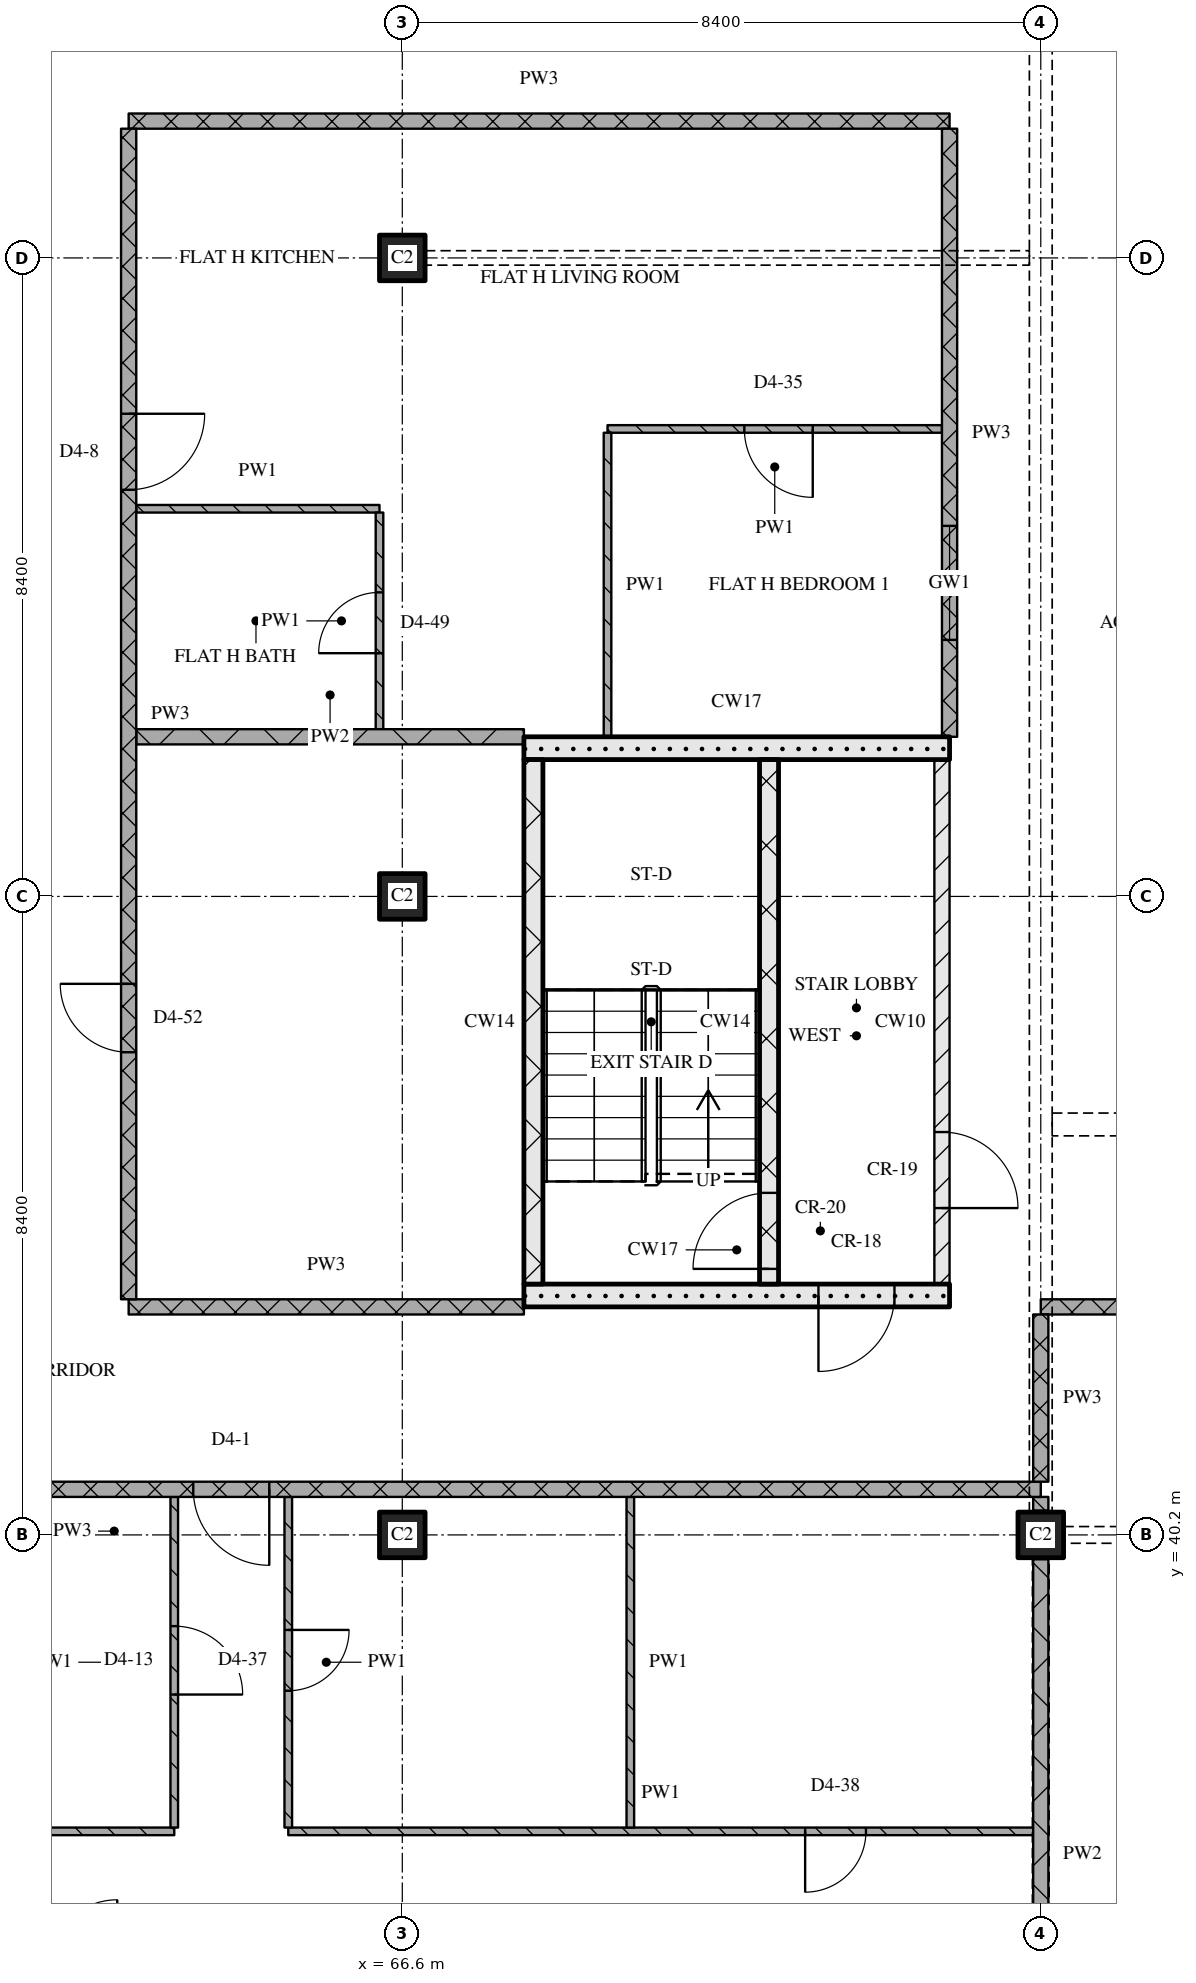
"""IFC4 building model, lengths in metres.
Left out: names, types, materials, properties, quantities, classifications, styles, units other than length and angle.
Written with IfcOpenShell. Run it as: python <this file> out.ifc"""

import sys

from ifc_helpers import new_model, si_unit, direction, frame, frame_2d, origin, origin_2d, place, context, subcontext, project, spatial, rectangle, extrude, element, fill, save


model = new_model("IFC4")
c1 = context("Model", 3, precision=1e-05, world=origin(), true_north=direction((0.0, 1.0)))
c2 = subcontext(c1, "Body", "Model", "MODEL_VIEW")
j1 = project(units=[si_unit("LENGTHUNIT", "METRE"), si_unit("PLANEANGLEUNIT", "RADIAN")], contexts=[c1])
p1 = place(None, origin())
s1 = spatial("IfcSite", under=j1, at=p1, CompositionType="ELEMENT")
p2 = place(p1, origin())
s2 = spatial("IfcBuilding", under=s1, at=p2, CompositionType="ELEMENT")
p3 = place(p2, frame((0.0, 0.0, 241.5)))
s3 = spatial("IfcBuildingStorey", under=s2, at=p3, CompositionType="ELEMENT", Elevation=241.5)
for number, where, z_axis, x_axis in (
    (1, (66.6, 40.2, 0.0), (0.0, 0.0, 1.0), (1.0, 0.0, 0.0)),
    (2, (66.6, 48.6, 0.0), (0.0, 0.0, 1.0), (1.0, 0.0, 0.0)),
    (3, (66.6, 57.0, 0.0), (0.0, 0.0, 1.0), (1.0, 0.0, 0.0)),
    (4, (75.0, 40.2, 0.0), (0.0, 0.0, 1.0), (1.0, 0.0, 0.0)),
):
    element("IfcColumn", number, at=place(p3, frame(where, z_axis=z_axis, x_axis=x_axis)), inside=s3, PredefinedType="COLUMN", context=c2, shape_type="SweptSolid", body=[
        extrude(rectangle(XDim=0.6, YDim=0.6, at=origin_2d()), origin(), (0.0, 0.0, 1.0), 3.6),
    ])
p4 = place(p3, frame((68.2, 43.35, 0.0), z_axis=(0.0, 0.0, 1.0), x_axis=(1.0, 0.0, 0.0)))
e5 = element("IfcWall", 5, at=p4, inside=s3, PredefinedType="SOLIDWALL", context=c2, shape_type="SweptSolid", body=[
    extrude(rectangle(XDim=5.6, YDim=0.3, at=frame_2d((2.8, 0.0))), origin(), (0.0, 0.0, 1.0), 3.32),
])
p5 = place(p4, frame((3.875, 0.0, 0.0)))
e6 = element("IfcOpeningElement", 6, at=p5, cuts=e5, PredefinedType="OPENING", context=c2, shape_type="SweptSolid", body=[
    extrude(rectangle(XDim=1.0, YDim=2.1, at=frame_2d((0.5, 1.05))), frame((0.0, 0.16, 0.0), z_axis=(0.0, -1.0, 0.0), x_axis=(1.0, 0.0, 0.0)), (0.0, 0.0, 1.0), 0.32),
])
p6 = place(p3, frame((68.325, 43.5, 0.0), z_axis=(0.0, 0.0, 1.0), x_axis=(0.0, 1.0, 0.0)))
e7 = element("IfcWall", 7, at=p6, inside=s3, PredefinedType="SOLIDWALL", context=c2, shape_type="SweptSolid", body=[
    extrude(rectangle(XDim=6.9, YDim=0.25, at=frame_2d((3.45, 0.0))), origin(), (0.0, 0.0, 1.0), 3.32),
])
p7 = place(p3, frame((71.425, 43.5, 0.0), z_axis=(0.0, 0.0, 1.0), x_axis=(0.0, 1.0, 0.0)))
e8 = element("IfcWall", 8, at=p7, inside=s3, PredefinedType="SOLIDWALL", context=c2, shape_type="SweptSolid", body=[
    extrude(rectangle(XDim=6.9, YDim=0.25, at=frame_2d((3.45, 0.0))), origin(), (0.0, 0.0, 1.0), 3.32),
])
p8 = place(p7, frame((0.2, 0.0, 0.0)))
e9 = element("IfcOpeningElement", 9, at=p8, cuts=e8, PredefinedType="OPENING", context=c2, shape_type="SweptSolid", body=[
    extrude(rectangle(XDim=1.0, YDim=2.1, at=frame_2d((0.5, 1.05))), frame((0.0, 0.135, 0.0), z_axis=(0.0, -1.0, 0.0), x_axis=(1.0, 0.0, 0.0)), (0.0, 0.0, 1.0), 0.27),
])
p9 = place(p3, frame((73.7, 43.5, 0.0), z_axis=(0.0, 0.0, 1.0), x_axis=(0.0, 1.0, 0.0)))
e10 = element("IfcWall", 10, at=p9, inside=s3, PredefinedType="PARTITIONING", context=c2, shape_type="SweptSolid", body=[
    extrude(rectangle(XDim=6.9, YDim=0.2, at=frame_2d((3.45, 0.0))), origin(), (0.0, 0.0, 1.0), 3.32),
])
p10 = place(p9, frame((1.0, 0.0, 0.0)))
e11 = element("IfcOpeningElement", 11, at=p10, cuts=e10, PredefinedType="OPENING", context=c2, shape_type="SweptSolid", body=[
    extrude(rectangle(XDim=1.0, YDim=2.1, at=frame_2d((0.5, 1.05))), frame((0.0, 0.11, 0.0), z_axis=(0.0, -1.0, 0.0), x_axis=(1.0, 0.0, 0.0)), (0.0, 0.0, 1.0), 0.22),
])
p11 = place(p3, frame((68.2, 50.55, 0.0), z_axis=(0.0, 0.0, 1.0), x_axis=(1.0, 0.0, 0.0)))
e12 = element("IfcWall", 12, at=p11, inside=s3, PredefinedType="SOLIDWALL", context=c2, shape_type="SweptSolid", body=[
    extrude(rectangle(XDim=5.6, YDim=0.3, at=frame_2d((2.8, 0.0))), origin(), (0.0, 0.0, 1.0), 3.32),
])
p12 = place(p3, frame((55.5, 36.3, 0.0), z_axis=(0.0, 0.0, 1.0), x_axis=(1.0, 0.0, 0.0)))
e13 = element("IfcWall", 13, at=p12, inside=s3, PredefinedType="PARTITIONING", context=c2, shape_type="SweptSolid", body=[
    extrude(rectangle(XDim=8.1, YDim=0.1, at=frame_2d((4.05, 0.0))), origin(), (0.0, 0.0, 1.0), 3.32),
])
p13 = place(p3, frame((65.1, 36.3, 0.0), z_axis=(0.0, 0.0, 1.0), x_axis=(1.0, 0.0, 0.0)))
e14 = element("IfcWall", 14, at=p13, inside=s3, PredefinedType="PARTITIONING", context=c2, shape_type="SweptSolid", body=[
    extrude(rectangle(XDim=9.8, YDim=0.1, at=frame_2d((4.9, 0.0))), origin(), (0.0, 0.0, 1.0), 3.32),
])
p14 = place(p13, frame((6.8, 0.0, 0.0)))
e15 = element("IfcOpeningElement", 15, at=p14, cuts=e14, PredefinedType="OPENING", context=c2, shape_type="SweptSolid", body=[
    extrude(rectangle(XDim=0.8, YDim=2.1, at=frame_2d((0.4, 1.05))), frame((0.0, 0.06, 0.0), z_axis=(0.0, -1.0, 0.0), x_axis=(1.0, 0.0, 0.0)), (0.0, 0.0, 1.0), 0.12),
])
p15 = place(p3, frame((75.0, 40.8, 0.0), z_axis=(0.0, 0.0, 1.0), x_axis=(-1.0, 0.0, 0.0)))
e16 = element("IfcWall", 16, at=p15, inside=s3, PredefinedType="PARTITIONING", context=c2, shape_type="SweptSolid", body=[
    extrude(rectangle(XDim=24.38, YDim=0.2, at=frame_2d((12.19, 0.0))), origin(), (0.0, 0.0, 1.0), 3.32),
])
p16 = place(p15, frame((10.15, 0.0, 0.0)))
e17 = element("IfcOpeningElement", 17, at=p16, cuts=e16, PredefinedType="OPENING", context=c2, shape_type="SweptSolid", body=[
    extrude(rectangle(XDim=1.0, YDim=2.1, at=frame_2d((0.5, 1.05))), frame((0.0, 0.11, 0.0), z_axis=(0.0, -1.0, 0.0), x_axis=(1.0, 0.0, 0.0)), (0.0, 0.0, 1.0), 0.22),
])
p17 = place(p3, frame((63.0, 43.2, 0.0), z_axis=(0.0, 0.0, 1.0), x_axis=(1.0, 0.0, 0.0)))
e18 = element("IfcWall", 18, at=p17, inside=s3, PredefinedType="PARTITIONING", context=c2, shape_type="SweptSolid", body=[
    extrude(rectangle(XDim=5.2, YDim=0.2, at=frame_2d((2.6, 0.0))), origin(), (0.0, 0.0, 1.0), 3.32),
])
p18 = place(p3, frame((100.2, 43.2, 0.0), z_axis=(0.0, 0.0, 1.0), x_axis=(-1.0, 0.0, 0.0)))
e19 = element("IfcWall", 19, at=p18, inside=s3, PredefinedType="PARTITIONING", context=c2, shape_type="SweptSolid", body=[
    extrude(rectangle(XDim=25.2, YDim=0.2, at=frame_2d((12.6, 0.0))), origin(), (0.0, 0.0, 1.0), 3.32),
])
p19 = place(p18, frame((9.25, 0.0, 0.0)))
e20 = element("IfcOpeningElement", 20, at=p19, cuts=e19, PredefinedType="OPENING", context=c2, shape_type="SweptSolid", body=[
    extrude(rectangle(XDim=1.0, YDim=2.1, at=frame_2d((0.5, 1.05))), frame((0.0, 0.11, 0.0), z_axis=(0.0, -1.0, 0.0), x_axis=(1.0, 0.0, 0.0)), (0.0, 0.0, 1.0), 0.22),
])
p20 = place(p3, frame((63.1, 50.7, 0.0), z_axis=(0.0, 0.0, 1.0), x_axis=(1.0, 0.0, 0.0)))
e21 = element("IfcWall", 21, at=p20, inside=s3, PredefinedType="PARTITIONING", context=c2, shape_type="SweptSolid", body=[
    extrude(rectangle(XDim=5.1, YDim=0.2, at=frame_2d((2.55, 0.0))), origin(), (0.0, 0.0, 1.0), 3.32),
])
p21 = place(p3, frame((63.1, 53.7, 0.0), z_axis=(0.0, 0.0, 1.0), x_axis=(1.0, 0.0, 0.0)))
e22 = element("IfcWall", 22, at=p21, inside=s3, PredefinedType="PARTITIONING", context=c2, shape_type="SweptSolid", body=[
    extrude(rectangle(XDim=3.2, YDim=0.1, at=frame_2d((1.6, 0.0))), origin(), (0.0, 0.0, 1.0), 3.32),
])
p22 = place(p3, frame((73.7, 54.75, 0.0), z_axis=(0.0, 0.0, 1.0), x_axis=(-1.0, 0.0, 0.0)))
e23 = element("IfcWall", 23, at=p22, inside=s3, PredefinedType="PARTITIONING", context=c2, shape_type="SweptSolid", body=[
    extrude(rectangle(XDim=4.4, YDim=0.1, at=frame_2d((2.2, 0.0))), origin(), (0.0, 0.0, 1.0), 3.32),
])
p23 = place(p22, frame((1.7, 0.0, 0.0)))
e24 = element("IfcOpeningElement", 24, at=p23, cuts=e23, PredefinedType="OPENING", context=c2, shape_type="SweptSolid", body=[
    extrude(rectangle(XDim=0.9, YDim=2.1, at=frame_2d((0.45, 1.05))), frame((0.0, 0.06, 0.0), z_axis=(0.0, -1.0, 0.0), x_axis=(1.0, 0.0, 0.0)), (0.0, 0.0, 1.0), 0.12),
])
p24 = place(p3, frame((63.0, 58.8, 0.0), z_axis=(0.0, 0.0, 1.0), x_axis=(1.0, 0.0, 0.0)))
e25 = element("IfcWall", 25, at=p24, inside=s3, PredefinedType="PARTITIONING", context=c2, shape_type="SweptSolid", body=[
    extrude(rectangle(XDim=10.8, YDim=0.2, at=frame_2d((5.4, 0.0))), origin(), (0.0, 0.0, 1.0), 3.32),
])
p25 = place(p3, frame((63.0, 58.7, 0.0), z_axis=(0.0, 0.0, 1.0), x_axis=(0.0, -1.0, 0.0)))
e26 = element("IfcWall", 26, at=p25, inside=s3, PredefinedType="PARTITIONING", context=c2, shape_type="SweptSolid", body=[
    extrude(rectangle(XDim=15.4, YDim=0.2, at=frame_2d((7.7, 0.0))), origin(), (0.0, 0.0, 1.0), 3.32),
])
p26 = place(p25, frame((3.75, 0.0, 0.0)))
e27 = element("IfcOpeningElement", 27, at=p26, cuts=e26, PredefinedType="OPENING", context=c2, shape_type="SweptSolid", body=[
    extrude(rectangle(XDim=1.0, YDim=2.1, at=frame_2d((0.5, 1.05))), frame((0.0, 0.11, 0.0), z_axis=(0.0, -1.0, 0.0), x_axis=(1.0, 0.0, 0.0)), (0.0, 0.0, 1.0), 0.22),
])
p27 = place(p25, frame((11.25, 0.0, 0.0)))
e28 = element("IfcOpeningElement", 28, at=p27, cuts=e26, PredefinedType="OPENING", context=c2, shape_type="SweptSolid", body=[
    extrude(rectangle(XDim=0.9, YDim=2.1, at=frame_2d((0.45, 1.05))), frame((0.0, 0.11, 0.0), z_axis=(0.0, -1.0, 0.0), x_axis=(1.0, 0.0, 0.0)), (0.0, 0.0, 1.0), 0.22),
])
p28 = place(p3, frame((63.6, 36.35, 0.0), z_axis=(0.0, 0.0, 1.0), x_axis=(0.0, 1.0, 0.0)))
e29 = element("IfcWall", 29, at=p28, inside=s3, PredefinedType="PARTITIONING", context=c2, shape_type="SweptSolid", body=[
    extrude(rectangle(XDim=4.35, YDim=0.1, at=frame_2d((2.175, 0.0))), origin(), (0.0, 0.0, 1.0), 3.32),
])
p29 = place(p28, frame((1.75, 0.0, 0.0)))
e30 = element("IfcOpeningElement", 30, at=p29, cuts=e29, PredefinedType="OPENING", context=c2, shape_type="SweptSolid", body=[
    extrude(rectangle(XDim=0.9, YDim=2.1, at=frame_2d((0.45, 1.05))), frame((0.0, 0.06, 0.0), z_axis=(0.0, -1.0, 0.0), x_axis=(1.0, 0.0, 0.0)), (0.0, 0.0, 1.0), 0.12),
])
p30 = place(p3, frame((65.1, 40.7, 0.0), z_axis=(0.0, 0.0, 1.0), x_axis=(0.0, -1.0, 0.0)))
e31 = element("IfcWall", 31, at=p30, inside=s3, PredefinedType="PARTITIONING", context=c2, shape_type="SweptSolid", body=[
    extrude(rectangle(XDim=4.35, YDim=0.1, at=frame_2d((2.175, 0.0))), origin(), (0.0, 0.0, 1.0), 3.32),
])
p31 = place(p30, frame((1.75, 0.0, 0.0)))
e32 = element("IfcOpeningElement", 32, at=p31, cuts=e31, PredefinedType="OPENING", context=c2, shape_type="SweptSolid", body=[
    extrude(rectangle(XDim=0.8, YDim=2.1, at=frame_2d((0.4, 1.05))), frame((0.0, 0.06, 0.0), z_axis=(0.0, -1.0, 0.0), x_axis=(1.0, 0.0, 0.0)), (0.0, 0.0, 1.0), 0.12),
])
p32 = place(p3, frame((66.3, 50.8, 0.0), z_axis=(0.0, 0.0, 1.0), x_axis=(0.0, 1.0, 0.0)))
e33 = element("IfcWall", 33, at=p32, inside=s3, PredefinedType="PARTITIONING", context=c2, shape_type="SweptSolid", body=[
    extrude(rectangle(XDim=2.85, YDim=0.1, at=frame_2d((1.425, 0.0))), origin(), (0.0, 0.0, 1.0), 3.32),
])
p33 = place(p32, frame((1.0, 0.0, 0.0)))
e34 = element("IfcOpeningElement", 34, at=p33, cuts=e33, PredefinedType="OPENING", context=c2, shape_type="SweptSolid", body=[
    extrude(rectangle(XDim=0.8, YDim=2.1, at=frame_2d((0.4, 1.05))), frame((0.0, 0.06, 0.0), z_axis=(0.0, -1.0, 0.0), x_axis=(1.0, 0.0, 0.0)), (0.0, 0.0, 1.0), 0.12),
])
p34 = place(p3, frame((69.3, 54.7, 0.0), z_axis=(0.0, 0.0, 1.0), x_axis=(0.0, -1.0, 0.0)))
e35 = element("IfcWall", 35, at=p34, inside=s3, PredefinedType="PARTITIONING", context=c2, shape_type="SweptSolid", body=[
    extrude(rectangle(XDim=4.0, YDim=0.1, at=frame_2d((2.0, 0.0))), origin(), (0.0, 0.0, 1.0), 3.32),
])
p35 = place(p3, frame((69.6, 40.7, 0.0), z_axis=(0.0, 0.0, 1.0), x_axis=(0.0, -1.0, 0.0)))
e36 = element("IfcWall", 36, at=p35, inside=s3, PredefinedType="PARTITIONING", context=c2, shape_type="SweptSolid", body=[
    extrude(rectangle(XDim=4.35, YDim=0.1, at=frame_2d((2.175, 0.0))), origin(), (0.0, 0.0, 1.0), 3.32),
])
p36 = place(p3, frame((73.8, 58.7, 0.0), z_axis=(0.0, 0.0, 1.0), x_axis=(0.0, -1.0, 0.0)))
e37 = element("IfcWall", 37, at=p36, inside=s3, PredefinedType="PARTITIONING", context=c2, shape_type="SweptSolid", body=[
    extrude(rectangle(XDim=8.0, YDim=0.2, at=frame_2d((4.0, 0.0))), origin(), (0.0, 0.0, 1.0), 3.32),
])
p37 = place(p36, frame((5.225, 0.0, 0.9)))
e38 = element("IfcOpeningElement", 38, at=p37, cuts=e37, PredefinedType="OPENING", context=c2, shape_type="SweptSolid", body=[
    extrude(rectangle(XDim=1.5, YDim=1.5, at=frame_2d((0.75, 0.75))), frame((0.0, 0.11, 0.0), z_axis=(0.0, -1.0, 0.0), x_axis=(1.0, 0.0, 0.0)), (0.0, 0.0, 1.0), 0.22),
])
p38 = place(p3, frame((75.0, 43.1, 0.0), z_axis=(0.0, 0.0, 1.0), x_axis=(0.0, -1.0, 0.0)))
e39 = element("IfcWall", 39, at=p38, inside=s3, PredefinedType="PARTITIONING", context=c2, shape_type="SweptSolid", body=[
    extrude(rectangle(XDim=2.2, YDim=0.2, at=frame_2d((1.1, 0.0))), origin(), (0.0, 0.0, 1.0), 2.53),
])
p39 = place(p3, frame((75.0, 39.88, 0.0), z_axis=(0.0, 0.0, 1.0), x_axis=(0.0, -1.0, 0.0)))
e40 = element("IfcWall", 40, at=p39, inside=s3, PredefinedType="PARTITIONING", context=c2, shape_type="SweptSolid", body=[
    extrude(rectangle(XDim=7.76, YDim=0.2, at=frame_2d((3.88, 0.0))), origin(), (0.0, 0.0, 1.0), 2.72),
])
p40 = place(p3, frame((75.0, 40.7, 0.0), z_axis=(0.0, 0.0, 1.0), x_axis=(0.0, -1.0, 0.0)))
e41 = element("IfcWall", 41, at=p40, inside=s3, PredefinedType="PARTITIONING", context=c2, shape_type="SweptSolid", body=[
    extrude(rectangle(XDim=0.18, YDim=0.2, at=frame_2d((0.09, 0.0))), origin(), (0.0, 0.0, 1.0), 3.32),
])
p41 = place(p5, origin())
e42 = element("IfcDoor", 42, at=p41, inside=s3, OperationType="SINGLE_SWING_RIGHT", PredefinedType="DOOR", context=c2, shape_type="SweptSolid", body=[
    extrude(rectangle(XDim=1.0, YDim=2.1, at=frame_2d((0.5, 1.05))), frame((0.0, 0.025, 0.0), z_axis=(0.0, -1.0, 0.0), x_axis=(1.0, 0.0, 0.0)), (0.0, 0.0, 1.0), 0.05),
])
fill(e6, e42)
p42 = place(p8, origin())
e43 = element("IfcDoor", 43, at=p42, inside=s3, OperationType="SINGLE_SWING_LEFT", PredefinedType="DOOR", context=c2, shape_type="SweptSolid", body=[
    extrude(rectangle(XDim=1.0, YDim=2.1, at=frame_2d((0.5, 1.05))), frame((0.0, 0.025, 0.0), z_axis=(0.0, -1.0, 0.0), x_axis=(1.0, 0.0, 0.0)), (0.0, 0.0, 1.0), 0.05),
])
fill(e9, e43)
p43 = place(p10, origin())
e44 = element("IfcDoor", 44, at=p43, inside=s3, OperationType="SINGLE_SWING_RIGHT", PredefinedType="DOOR", context=c2, shape_type="SweptSolid", body=[
    extrude(rectangle(XDim=1.0, YDim=2.1, at=frame_2d((0.5, 1.05))), frame((0.0, 0.025, 0.0), z_axis=(0.0, -1.0, 0.0), x_axis=(1.0, 0.0, 0.0)), (0.0, 0.0, 1.0), 0.05),
])
fill(e11, e44)
p44 = place(p14, origin())
e45 = element("IfcDoor", 45, at=p44, inside=s3, OperationType="SINGLE_SWING_RIGHT", PredefinedType="DOOR", context=c2, shape_type="SweptSolid", body=[
    extrude(rectangle(XDim=0.8, YDim=2.1, at=frame_2d((0.4, 1.05))), frame((0.0, 0.025, 0.0), z_axis=(0.0, -1.0, 0.0), x_axis=(1.0, 0.0, 0.0)), (0.0, 0.0, 1.0), 0.05),
])
fill(e15, e45)
p45 = place(p16, origin())
e46 = element("IfcDoor", 46, at=p45, inside=s3, OperationType="SINGLE_SWING_LEFT", PredefinedType="DOOR", context=c2, shape_type="SweptSolid", body=[
    extrude(rectangle(XDim=1.0, YDim=2.1, at=frame_2d((0.5, 1.05))), frame((0.0, 0.025, 0.0), z_axis=(0.0, -1.0, 0.0), x_axis=(1.0, 0.0, 0.0)), (0.0, 0.0, 1.0), 0.05),
])
fill(e17, e46)
p46 = place(p23, origin())
e47 = element("IfcDoor", 47, at=p46, inside=s3, OperationType="SINGLE_SWING_LEFT", PredefinedType="DOOR", context=c2, shape_type="SweptSolid", body=[
    extrude(rectangle(XDim=0.9, YDim=2.1, at=frame_2d((0.45, 1.05))), frame((0.0, 0.025, 0.0), z_axis=(0.0, -1.0, 0.0), x_axis=(1.0, 0.0, 0.0)), (0.0, 0.0, 1.0), 0.05),
])
fill(e24, e47)
p47 = place(p26, origin())
e48 = element("IfcDoor", 48, at=p47, inside=s3, OperationType="SINGLE_SWING_LEFT", PredefinedType="DOOR", context=c2, shape_type="SweptSolid", body=[
    extrude(rectangle(XDim=1.0, YDim=2.1, at=frame_2d((0.5, 1.05))), frame((0.0, 0.025, 0.0), z_axis=(0.0, -1.0, 0.0), x_axis=(1.0, 0.0, 0.0)), (0.0, 0.0, 1.0), 0.05),
])
fill(e27, e48)
p48 = place(p27, origin())
e49 = element("IfcDoor", 49, at=p48, inside=s3, OperationType="SINGLE_SWING_RIGHT", PredefinedType="DOOR", context=c2, shape_type="SweptSolid", body=[
    extrude(rectangle(XDim=0.9, YDim=2.1, at=frame_2d((0.45, 1.05))), frame((0.0, 0.025, 0.0), z_axis=(0.0, -1.0, 0.0), x_axis=(1.0, 0.0, 0.0)), (0.0, 0.0, 1.0), 0.05),
])
fill(e28, e49)
p49 = place(p29, origin())
e50 = element("IfcDoor", 50, at=p49, inside=s3, OperationType="SINGLE_SWING_RIGHT", PredefinedType="DOOR", context=c2, shape_type="SweptSolid", body=[
    extrude(rectangle(XDim=0.9, YDim=2.1, at=frame_2d((0.45, 1.05))), frame((0.0, 0.025, 0.0), z_axis=(0.0, -1.0, 0.0), x_axis=(1.0, 0.0, 0.0)), (0.0, 0.0, 1.0), 0.05),
])
fill(e30, e50)
p50 = place(p31, origin())
e51 = element("IfcDoor", 51, at=p50, inside=s3, OperationType="SINGLE_SWING_LEFT", PredefinedType="DOOR", context=c2, shape_type="SweptSolid", body=[
    extrude(rectangle(XDim=0.8, YDim=2.1, at=frame_2d((0.4, 1.05))), frame((0.0, 0.025, 0.0), z_axis=(0.0, -1.0, 0.0), x_axis=(1.0, 0.0, 0.0)), (0.0, 0.0, 1.0), 0.05),
])
fill(e32, e51)
p51 = place(p33, origin())
e52 = element("IfcDoor", 52, at=p51, inside=s3, OperationType="SINGLE_SWING_LEFT", PredefinedType="DOOR", context=c2, shape_type="SweptSolid", body=[
    extrude(rectangle(XDim=0.8, YDim=2.1, at=frame_2d((0.4, 1.05))), frame((0.0, 0.025, 0.0), z_axis=(0.0, -1.0, 0.0), x_axis=(1.0, 0.0, 0.0)), (0.0, 0.0, 1.0), 0.05),
])
fill(e34, e52)
p52 = place(p37, origin())
e53 = element("IfcWindow", 53, at=p52, inside=s3, PartitioningType="SINGLE_PANEL", PredefinedType="WINDOW", context=c2, shape_type="SweptSolid", body=[
    extrude(rectangle(XDim=1.5, YDim=1.5, at=frame_2d((0.75, 0.75))), frame((0.0, 0.03, 0.0), z_axis=(0.0, -1.0, 0.0), x_axis=(1.0, 0.0, 0.0)), (0.0, 0.0, 1.0), 0.06),
])
fill(e38, e53)
save(model, sys.argv[1])
